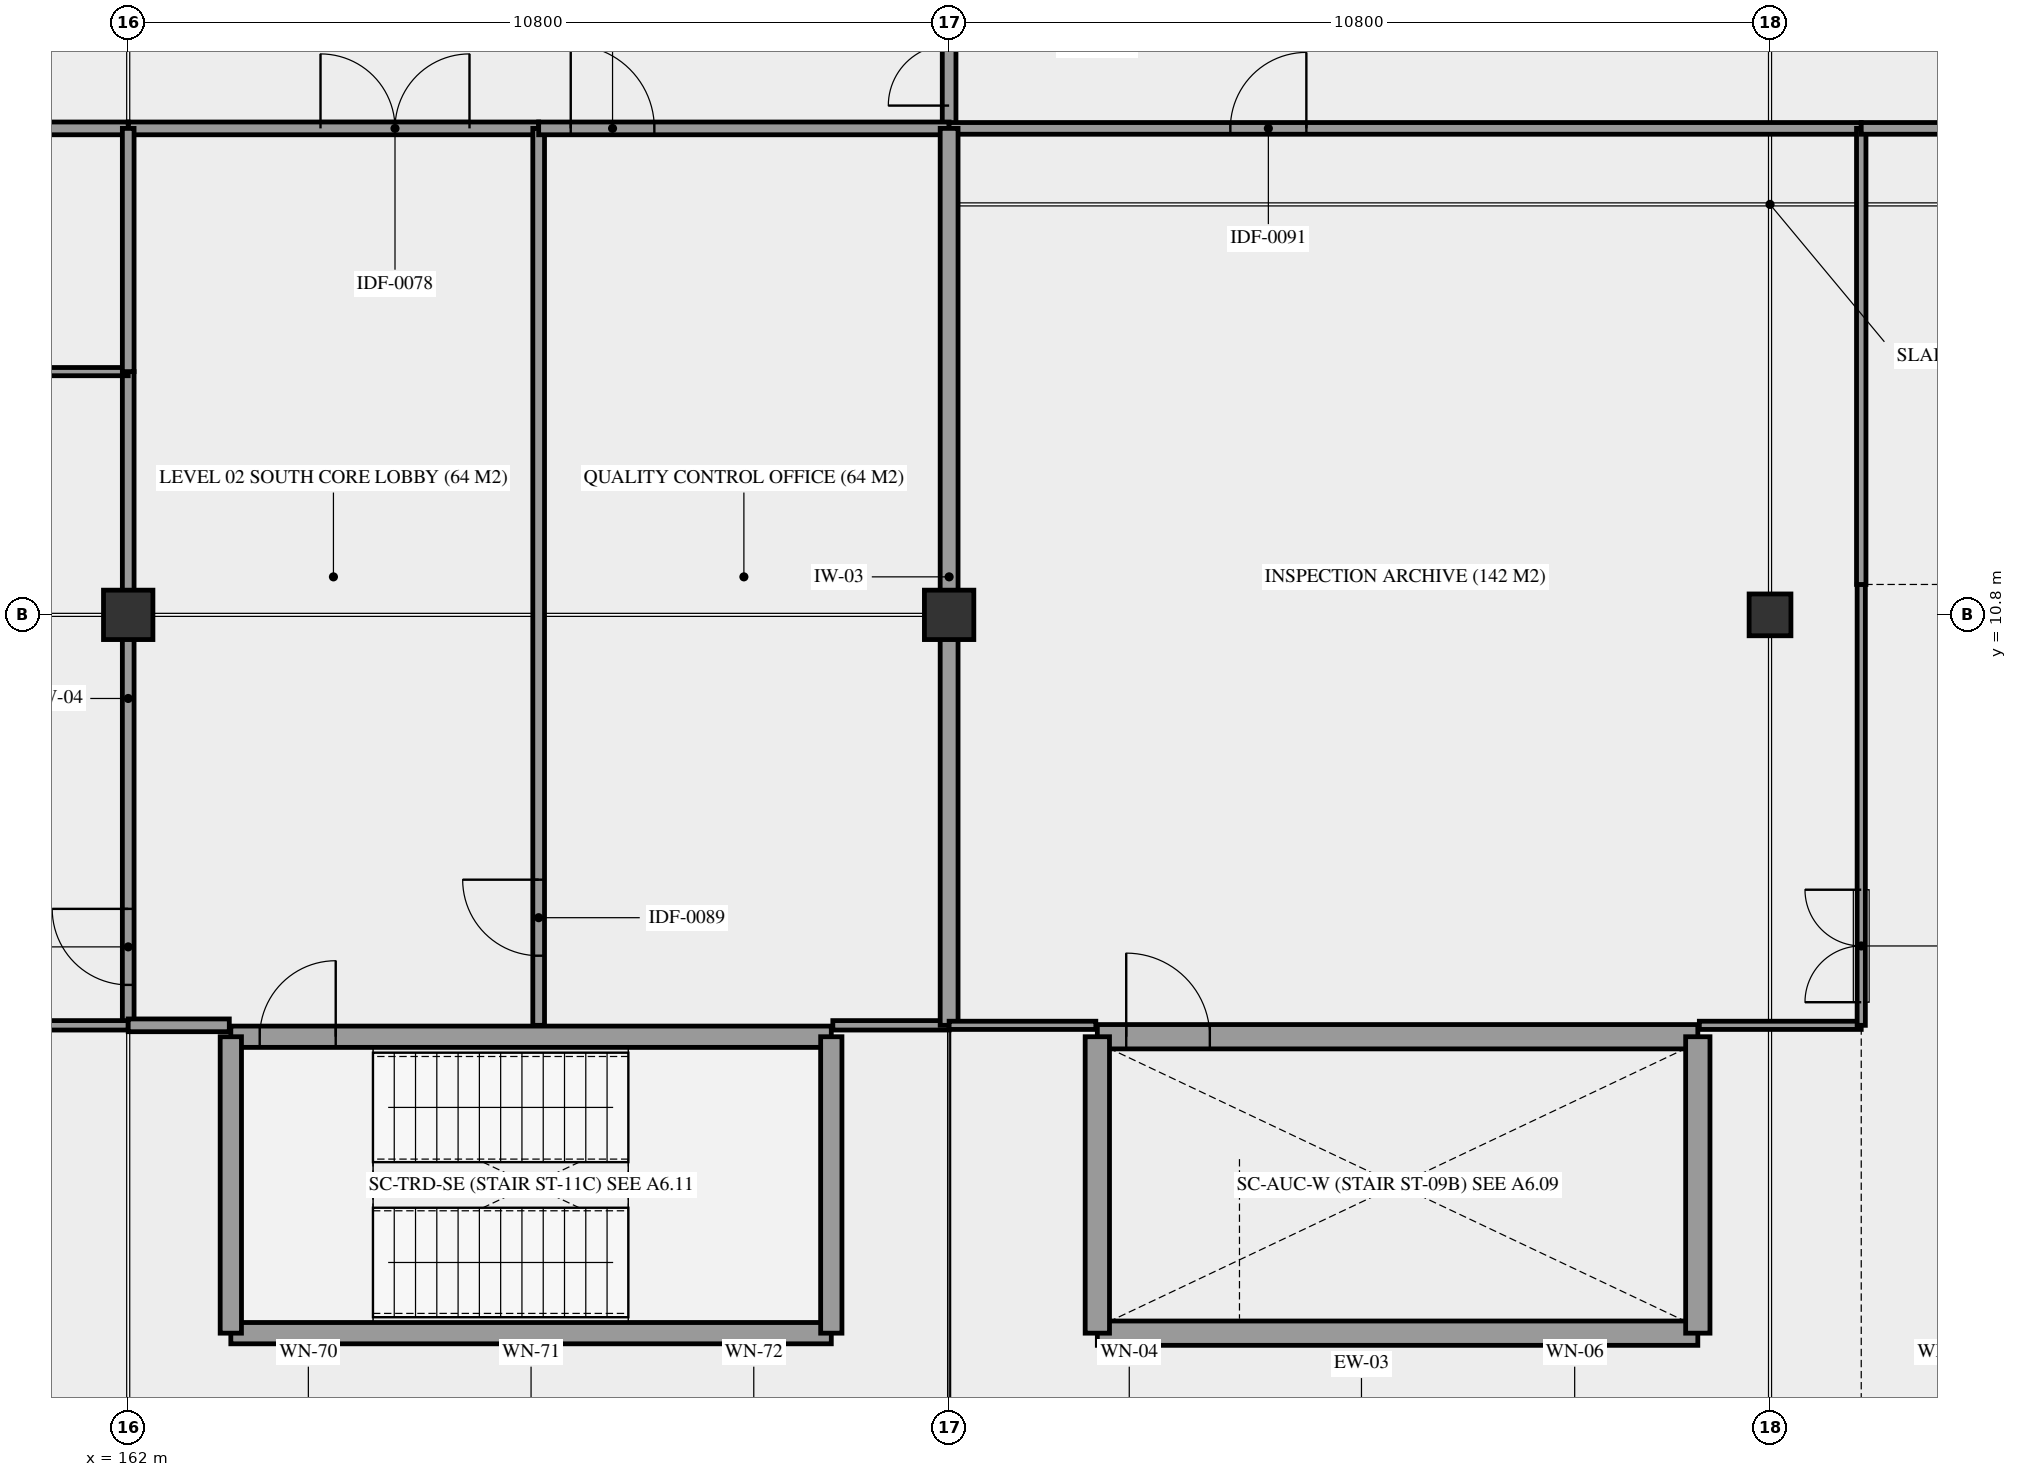
"""IFC4 building model, lengths in metres.
Left out: names, types, materials, properties, quantities, classifications, styles, units other than length and angle.
Written with IfcOpenShell. Run it as: python <this file> out.ifc"""

import sys

from ifc_helpers import new_model, si_unit, direction, frame, frame_2d, origin, origin_2d, place, context, subcontext, project, spatial, rectangle, extrude, element, fill, save


model = new_model("IFC4")
c1 = context("Model", 3, precision=1e-05, world=origin(), true_north=direction((0.0, 1.0)))
c2 = subcontext(c1, "Body", "Model", "MODEL_VIEW")
j1 = project(units=[si_unit("LENGTHUNIT", "METRE"), si_unit("PLANEANGLEUNIT", "RADIAN")], contexts=[c1])
p1 = place(None, origin())
s1 = spatial("IfcSite", under=j1, at=p1, CompositionType="ELEMENT")
p2 = place(p1, origin())
s2 = spatial("IfcBuilding", under=s1, at=p2, CompositionType="ELEMENT")
p3 = place(p2, frame((0.0, 0.0, 10.08)))
s3 = spatial("IfcBuildingStorey", under=s2, at=p3, CompositionType="ELEMENT", Elevation=10.08)
for number, where, z_axis, x_axis in (
    (1, (162.0, 10.8, 0.0), (0.0, 0.0, 1.0), (1.0, 0.0, 0.0)),
    (2, (172.8, 10.8, 0.0), (0.0, 0.0, 1.0), (1.0, 0.0, 0.0)),
):
    element("IfcColumn", number, at=place(p3, frame(where, z_axis=z_axis, x_axis=x_axis)), inside=s3, PredefinedType="COLUMN", context=c2, shape_type="SweptSolid", body=[
        extrude(rectangle(XDim=0.65, YDim=0.65, at=origin_2d()), origin(), (0.0, 0.0, 1.0), 4.68),
    ])
p4 = place(p3, frame((183.6, 10.8, 0.0), z_axis=(0.0, 0.0, 1.0), x_axis=(1.0, 0.0, 0.0)))
e3 = element("IfcColumn", 3, at=p4, inside=s3, PredefinedType="COLUMN", context=c2, shape_type="SweptSolid", body=[
    extrude(rectangle(XDim=0.55, YDim=0.55, at=origin_2d()), origin(), (0.0, 0.0, 1.0), 4.68),
])
p5 = place(p3, frame((174.75, 1.35, 0.0), z_axis=(0.0, 0.0, 1.0), x_axis=(1.0, 0.0, 0.0)))
e4 = element("IfcWall", 4, at=p5, inside=s3, PredefinedType="SHEAR", context=c2, shape_type="SweptSolid", body=[
    extrude(rectangle(XDim=7.9, YDim=0.32, at=frame_2d((3.95, 0.0))), origin(), (0.0, 0.0, 1.0), 4.68),
])
p6 = place(p3, frame((174.75, 5.25, 0.0), z_axis=(0.0, 0.0, 1.0), x_axis=(1.0, 0.0, 0.0)))
e5 = element("IfcWall", 5, at=p6, inside=s3, PredefinedType="SHEAR", context=c2, shape_type="SweptSolid", body=[
    extrude(rectangle(XDim=7.9, YDim=0.32, at=frame_2d((3.95, 0.0))), origin(), (0.0, 0.0, 1.0), 4.68),
])
p7 = place(p6, frame((0.38, 0.0, 0.0)))
e6 = element("IfcOpeningElement", 6, at=p7, cuts=e5, PredefinedType="OPENING", context=c2, shape_type="SweptSolid", body=[
    extrude(rectangle(XDim=1.1, YDim=2.2, at=frame_2d((0.55, 1.1))), frame((0.0, 0.17, 0.0), z_axis=(0.0, -1.0, 0.0), x_axis=(1.0, 0.0, 0.0)), (0.0, 0.0, 1.0), 0.34),
])
for number, where, z_axis, x_axis in (
    (7, (174.75, 1.35, 0.0), (0.0, 0.0, 1.0), (0.0, 1.0, 0.0)),
    (8, (182.65, 1.35, 0.0), (0.0, 0.0, 1.0), (0.0, 1.0, 0.0)),
):
    element("IfcWall", number, at=place(p3, frame(where, z_axis=z_axis, x_axis=x_axis)), inside=s3, PredefinedType="SHEAR", context=c2, shape_type="SweptSolid", body=[
        extrude(rectangle(XDim=3.9, YDim=0.32, at=frame_2d((1.95, 0.0))), origin(), (0.0, 0.0, 1.0), 4.68),
    ])
p8 = place(p3, frame((163.35, 1.35, 0.0), z_axis=(0.0, 0.0, 1.0), x_axis=(1.0, 0.0, 0.0)))
e9 = element("IfcWall", 9, at=p8, inside=s3, PredefinedType="SHEAR", context=c2, shape_type="SweptSolid", body=[
    extrude(rectangle(XDim=7.9, YDim=0.28, at=frame_2d((3.95, 0.0))), origin(), (0.0, 0.0, 1.0), 4.68),
])
p9 = place(p3, frame((163.35, 5.25, 0.0), z_axis=(0.0, 0.0, 1.0), x_axis=(1.0, 0.0, 0.0)))
e10 = element("IfcWall", 10, at=p9, inside=s3, PredefinedType="SHEAR", context=c2, shape_type="SweptSolid", body=[
    extrude(rectangle(XDim=7.9, YDim=0.28, at=frame_2d((3.95, 0.0))), origin(), (0.0, 0.0, 1.0), 4.68),
])
p10 = place(p9, frame((0.38, 0.0, 0.0)))
e11 = element("IfcOpeningElement", 11, at=p10, cuts=e10, PredefinedType="OPENING", context=c2, shape_type="SweptSolid", body=[
    extrude(rectangle(XDim=1.0, YDim=2.15, at=frame_2d((0.5, 1.075))), frame((0.0, 0.15, 0.0), z_axis=(0.0, -1.0, 0.0), x_axis=(1.0, 0.0, 0.0)), (0.0, 0.0, 1.0), 0.3),
])
for number, where, z_axis, x_axis in (
    (12, (163.35, 1.35, 0.0), (0.0, 0.0, 1.0), (0.0, 1.0, 0.0)),
    (13, (171.25, 1.35, 0.0), (0.0, 0.0, 1.0), (0.0, 1.0, 0.0)),
):
    element("IfcWall", number, at=place(p3, frame(where, z_axis=z_axis, x_axis=x_axis)), inside=s3, PredefinedType="SHEAR", context=c2, shape_type="SweptSolid", body=[
        extrude(rectangle(XDim=3.9, YDim=0.28, at=frame_2d((1.95, 0.0))), origin(), (0.0, 0.0, 1.0), 4.68),
    ])
p11 = place(p3, frame((162.0, 17.2, 0.0), z_axis=(0.0, 0.0, 1.0), x_axis=(1.0, 0.0, 0.0)))
e14 = element("IfcWall", 14, at=p11, inside=s3, PredefinedType="PARTITIONING", context=c2, shape_type="SweptSolid", body=[
    extrude(rectangle(XDim=5.4, YDim=0.168, at=frame_2d((2.7, 0.0))), origin(), (0.0, 0.0, 1.0), 3.23),
])
p12 = place(p11, frame((2.53, 0.0, 0.0)))
e15 = element("IfcOpeningElement", 15, at=p12, cuts=e14, PredefinedType="OPENING", context=c2, shape_type="SweptSolid", body=[
    extrude(rectangle(XDim=1.96, YDim=2.3, at=frame_2d((0.98, 1.15))), frame((0.0, 0.094, 0.0), z_axis=(0.0, -1.0, 0.0), x_axis=(1.0, 0.0, 0.0)), (0.0, 0.0, 1.0), 0.188),
])
p13 = place(p3, frame((172.8, 17.2, 0.0), z_axis=(0.0, 0.0, 1.0), x_axis=(0.0, 1.0, 0.0)))
e16 = element("IfcWall", 16, at=p13, inside=s3, PredefinedType="PARTITIONING", context=c2, shape_type="SweptSolid", body=[
    extrude(rectangle(XDim=4.4, YDim=0.18, at=frame_2d((2.2, 0.0))), origin(), (0.0, 0.0, 1.0), 3.23),
])
p14 = place(p13, frame((0.3, 0.0, 0.0)))
e17 = element("IfcOpeningElement", 17, at=p14, cuts=e16, PredefinedType="OPENING", context=c2, shape_type="SweptSolid", body=[
    extrude(rectangle(XDim=1.6, YDim=2.2, at=frame_2d((0.8, 1.1))), frame((0.0, 0.1, 0.0), z_axis=(0.0, -1.0, 0.0), x_axis=(1.0, 0.0, 0.0)), (0.0, 0.0, 1.0), 0.2),
])
p15 = place(p3, frame((162.0, 5.4, 0.0), z_axis=(0.0, 0.0, 1.0), x_axis=(0.0, 1.0, 0.0)))
e18 = element("IfcWall", 18, at=p15, inside=s3, PredefinedType="PARTITIONING", context=c2, shape_type="SweptSolid", body=[
    extrude(rectangle(XDim=8.6, YDim=0.154, at=frame_2d((4.3, 0.0))), origin(), (0.0, 0.0, 1.0), 3.23),
])
p16 = place(p15, frame((0.532, 0.0, 0.0)))
e19 = element("IfcOpeningElement", 19, at=p16, cuts=e18, PredefinedType="OPENING", context=c2, shape_type="SweptSolid", body=[
    extrude(rectangle(XDim=1.0, YDim=2.15, at=frame_2d((0.5, 1.075))), frame((0.0, 0.087, 0.0), z_axis=(0.0, -1.0, 0.0), x_axis=(1.0, 0.0, 0.0)), (0.0, 0.0, 1.0), 0.174),
])
p17 = place(p3, frame((167.4, 5.4, 0.0), z_axis=(0.0, 0.0, 1.0), x_axis=(0.0, 1.0, 0.0)))
e20 = element("IfcWall", 20, at=p17, inside=s3, PredefinedType="PARTITIONING", context=c2, shape_type="SweptSolid", body=[
    extrude(rectangle(XDim=11.8, YDim=0.154, at=frame_2d((5.9, 0.0))), origin(), (0.0, 0.0, 1.0), 3.23),
])
p18 = place(p17, frame((0.916, 0.0, 0.0)))
e21 = element("IfcOpeningElement", 21, at=p18, cuts=e20, PredefinedType="OPENING", context=c2, shape_type="SweptSolid", body=[
    extrude(rectangle(XDim=1.0, YDim=2.15, at=frame_2d((0.5, 1.075))), frame((0.0, 0.087, 0.0), z_axis=(0.0, -1.0, 0.0), x_axis=(1.0, 0.0, 0.0)), (0.0, 0.0, 1.0), 0.174),
])
p19 = place(p3, frame((167.4, 17.2, 0.0), z_axis=(0.0, 0.0, 1.0), x_axis=(1.0, 0.0, 0.0)))
e22 = element("IfcWall", 22, at=p19, inside=s3, PredefinedType="PARTITIONING", context=c2, shape_type="SweptSolid", body=[
    extrude(rectangle(XDim=5.4, YDim=0.168, at=frame_2d((2.7, 0.0))), origin(), (0.0, 0.0, 1.0), 3.23),
])
p20 = place(p19, frame((0.422, 0.0, 0.0)))
e23 = element("IfcOpeningElement", 23, at=p20, cuts=e22, PredefinedType="OPENING", context=c2, shape_type="SweptSolid", body=[
    extrude(rectangle(XDim=1.1, YDim=2.2, at=frame_2d((0.55, 1.1))), frame((0.0, 0.094, 0.0), z_axis=(0.0, -1.0, 0.0), x_axis=(1.0, 0.0, 0.0)), (0.0, 0.0, 1.0), 0.188),
])
p21 = place(p3, frame((172.8, 17.2, 0.0), z_axis=(0.0, 0.0, 1.0), x_axis=(1.0, 0.0, 0.0)))
e24 = element("IfcWall", 24, at=p21, inside=s3, PredefinedType="PARTITIONING", context=c2, shape_type="SweptSolid", body=[
    extrude(rectangle(XDim=12.0, YDim=0.154, at=frame_2d((6.0, 0.0))), origin(), (0.0, 0.0, 1.0), 3.23),
])
p22 = place(p21, frame((3.7, 0.0, 0.0)))
e25 = element("IfcOpeningElement", 25, at=p22, cuts=e24, PredefinedType="OPENING", context=c2, shape_type="SweptSolid", body=[
    extrude(rectangle(XDim=1.0, YDim=2.15, at=frame_2d((0.5, 1.075))), frame((0.0, 0.087, 0.0), z_axis=(0.0, -1.0, 0.0), x_axis=(1.0, 0.0, 0.0)), (0.0, 0.0, 1.0), 0.174),
])
p23 = place(p3, frame((151.2, 5.4, 0.0), z_axis=(0.0, 0.0, 1.0), x_axis=(1.0, 0.0, 0.0)))
e26 = element("IfcWall", 26, at=p23, inside=s3, PredefinedType="PARTITIONING", context=c2, shape_type="SweptSolid", body=[
    extrude(rectangle(XDim=10.8, YDim=0.124, at=frame_2d((5.4, 0.0))), origin(), (0.0, 0.0, 1.0), 3.23),
])
p24 = place(p3, frame((157.62, 14.0, 0.0), z_axis=(0.0, 0.0, 1.0), x_axis=(1.0, 0.0, 0.0)))
e27 = element("IfcWall", 27, at=p24, inside=s3, PredefinedType="PARTITIONING", context=c2, shape_type="SweptSolid", body=[
    extrude(rectangle(XDim=4.38, YDim=0.108, at=frame_2d((2.19, 0.0))), origin(), (0.0, 0.0, 1.0), 3.23),
])
p25 = place(p3, frame((157.62, 17.2, 0.0), z_axis=(0.0, 0.0, 1.0), x_axis=(1.0, 0.0, 0.0)))
e28 = element("IfcWall", 28, at=p25, inside=s3, PredefinedType="PARTITIONING", context=c2, shape_type="SweptSolid", body=[
    extrude(rectangle(XDim=4.38, YDim=0.168, at=frame_2d((2.19, 0.0))), origin(), (0.0, 0.0, 1.0), 3.23),
])
p26 = place(p3, frame((162.0, 5.4, 0.0), z_axis=(0.0, 0.0, 1.0), x_axis=(1.0, 0.0, 0.0)))
e29 = element("IfcWall", 29, at=p26, inside=s3, PredefinedType="PARTITIONING", context=c2, shape_type="SweptSolid", body=[
    extrude(rectangle(XDim=1.33, YDim=0.168, at=frame_2d((0.665, 0.0))), origin(), (0.0, 0.0, 1.0), 3.23),
])
p27 = place(p3, frame((162.0, 14.0, 0.0), z_axis=(0.0, 0.0, 1.0), x_axis=(0.0, 1.0, 0.0)))
e30 = element("IfcWall", 30, at=p27, inside=s3, PredefinedType="PARTITIONING", context=c2, shape_type="SweptSolid", body=[
    extrude(rectangle(XDim=3.2, YDim=0.154, at=frame_2d((1.6, 0.0))), origin(), (0.0, 0.0, 1.0), 3.23),
])
p28 = place(p3, frame((171.27, 5.4, 0.0), z_axis=(0.0, 0.0, 1.0), x_axis=(1.0, 0.0, 0.0)))
e31 = element("IfcWall", 31, at=p28, inside=s3, PredefinedType="PARTITIONING", context=c2, shape_type="SweptSolid", body=[
    extrude(rectangle(XDim=1.53, YDim=0.124, at=frame_2d((0.765, 0.0))), origin(), (0.0, 0.0, 1.0), 3.23),
])
p29 = place(p3, frame((172.8, 5.4, 0.0), z_axis=(0.0, 0.0, 1.0), x_axis=(0.0, 1.0, 0.0)))
e32 = element("IfcWall", 32, at=p29, inside=s3, PredefinedType="PARTITIONING", context=c2, shape_type="SweptSolid", body=[
    extrude(rectangle(XDim=11.8, YDim=0.235, at=frame_2d((5.9, 0.0))), origin(), (0.0, 0.0, 1.0), 3.23),
])
p30 = place(p3, frame((172.8, 5.4, 0.0), z_axis=(0.0, 0.0, 1.0), x_axis=(1.0, 0.0, 0.0)))
e33 = element("IfcWall", 33, at=p30, inside=s3, PredefinedType="PARTITIONING", context=c2, shape_type="SweptSolid", body=[
    extrude(rectangle(XDim=1.93, YDim=0.108, at=frame_2d((0.965, 0.0))), origin(), (0.0, 0.0, 1.0), 3.23),
])
p31 = place(p3, frame((182.67, 5.4, 0.0), z_axis=(0.0, 0.0, 1.0), x_axis=(1.0, 0.0, 0.0)))
e34 = element("IfcWall", 34, at=p31, inside=s3, PredefinedType="PARTITIONING", context=c2, shape_type="SweptSolid", body=[
    extrude(rectangle(XDim=2.13, YDim=0.108, at=frame_2d((1.065, 0.0))), origin(), (0.0, 0.0, 1.0), 3.23),
])
p32 = place(p3, frame((184.8, 5.4, 0.0), z_axis=(0.0, 0.0, 1.0), x_axis=(0.0, 1.0, 0.0)))
e35 = element("IfcWall", 35, at=p32, inside=s3, PredefinedType="PARTITIONING", context=c2, shape_type="SweptSolid", body=[
    extrude(rectangle(XDim=5.8, YDim=0.108, at=frame_2d((2.9, 0.0))), origin(), (0.0, 0.0, 1.0), 3.23),
])
p33 = place(p32, frame((0.304, 0.0, 0.0)))
e36 = element("IfcOpeningElement", 36, at=p33, cuts=e35, PredefinedType="OPENING", context=c2, shape_type="SweptSolid", body=[
    extrude(rectangle(XDim=1.48, YDim=2.2, at=frame_2d((0.74, 1.1))), frame((0.0, 0.064, 0.0), z_axis=(0.0, -1.0, 0.0), x_axis=(1.0, 0.0, 0.0)), (0.0, 0.0, 1.0), 0.128),
])
p34 = place(p3, frame((184.8, 11.2, 0.0), z_axis=(0.0, 0.0, 1.0), x_axis=(0.0, 1.0, 0.0)))
e37 = element("IfcWall", 37, at=p34, inside=s3, PredefinedType="PARTITIONING", context=c2, shape_type="SweptSolid", body=[
    extrude(rectangle(XDim=6.0, YDim=0.124, at=frame_2d((3.0, 0.0))), origin(), (0.0, 0.0, 1.0), 3.23),
])
p35 = place(p3, frame((184.8, 17.2, 0.0), z_axis=(0.0, 0.0, 1.0), x_axis=(1.0, 0.0, 0.0)))
e38 = element("IfcWall", 38, at=p35, inside=s3, PredefinedType="PARTITIONING", context=c2, shape_type="SweptSolid", body=[
    extrude(rectangle(XDim=10.4, YDim=0.154, at=frame_2d((5.2, 0.0))), origin(), (0.0, 0.0, 1.0), 3.23),
])
p36 = place(p7, origin())
e39 = element("IfcDoor", 39, at=p36, inside=s3, OperationType="SINGLE_SWING_LEFT", PredefinedType="DOOR", context=c2, shape_type="SweptSolid", body=[
    extrude(rectangle(XDim=1.1, YDim=2.2, at=frame_2d((0.55, 1.1))), frame((0.0, 0.025, 0.0), z_axis=(0.0, -1.0, 0.0), x_axis=(1.0, 0.0, 0.0)), (0.0, 0.0, 1.0), 0.05),
])
fill(e6, e39)
p37 = place(p10, origin())
e40 = element("IfcDoor", 40, at=p37, inside=s3, OperationType="SINGLE_SWING_RIGHT", PredefinedType="DOOR", context=c2, shape_type="SweptSolid", body=[
    extrude(rectangle(XDim=1.0, YDim=2.15, at=frame_2d((0.5, 1.075))), frame((0.0, 0.025, 0.0), z_axis=(0.0, -1.0, 0.0), x_axis=(1.0, 0.0, 0.0)), (0.0, 0.0, 1.0), 0.05),
])
fill(e11, e40)
p38 = place(p12, frame((1.96, 0.0, 0.0), z_axis=(0.0, 0.0, 1.0), x_axis=(-1.0, 0.0, 0.0)))
e41 = element("IfcDoor", 41, at=p38, inside=s3, OperationType="DOUBLE_DOOR_SINGLE_SWING", PredefinedType="DOOR", context=c2, shape_type="SweptSolid", body=[
    extrude(rectangle(XDim=1.96, YDim=2.3, at=frame_2d((0.98, 1.15))), frame((0.0, 0.025, 0.0), z_axis=(0.0, -1.0, 0.0), x_axis=(1.0, 0.0, 0.0)), (0.0, 0.0, 1.0), 0.05),
])
fill(e15, e41)
p39 = place(p14, origin())
e42 = element("IfcDoor", 42, at=p39, inside=s3, OperationType="DOUBLE_DOOR_SINGLE_SWING", PredefinedType="DOOR", context=c2, shape_type="SweptSolid", body=[
    extrude(rectangle(XDim=1.6, YDim=2.2, at=frame_2d((0.8, 1.1))), frame((0.0, 0.025, 0.0), z_axis=(0.0, -1.0, 0.0), x_axis=(1.0, 0.0, 0.0)), (0.0, 0.0, 1.0), 0.05),
])
fill(e17, e42)
p40 = place(p16, frame((1.0, 0.0, 0.0), z_axis=(0.0, 0.0, 1.0), x_axis=(-1.0, 0.0, 0.0)))
e43 = element("IfcDoor", 43, at=p40, inside=s3, OperationType="SINGLE_SWING_RIGHT", PredefinedType="DOOR", context=c2, shape_type="SweptSolid", body=[
    extrude(rectangle(XDim=1.0, YDim=2.15, at=frame_2d((0.5, 1.075))), frame((0.0, 0.025, 0.0), z_axis=(0.0, -1.0, 0.0), x_axis=(1.0, 0.0, 0.0)), (0.0, 0.0, 1.0), 0.05),
])
fill(e19, e43)
p41 = place(p18, origin())
e44 = element("IfcDoor", 44, at=p41, inside=s3, OperationType="SINGLE_SWING_RIGHT", PredefinedType="DOOR", context=c2, shape_type="SweptSolid", body=[
    extrude(rectangle(XDim=1.0, YDim=2.15, at=frame_2d((0.5, 1.075))), frame((0.0, 0.025, 0.0), z_axis=(0.0, -1.0, 0.0), x_axis=(1.0, 0.0, 0.0)), (0.0, 0.0, 1.0), 0.05),
])
fill(e21, e44)
p42 = place(p20, frame((1.1, 0.0, 0.0), z_axis=(0.0, 0.0, 1.0), x_axis=(-1.0, 0.0, 0.0)))
e45 = element("IfcDoor", 45, at=p42, inside=s3, OperationType="SINGLE_SWING_LEFT", PredefinedType="DOOR", context=c2, shape_type="SweptSolid", body=[
    extrude(rectangle(XDim=1.1, YDim=2.2, at=frame_2d((0.55, 1.1))), frame((0.0, 0.025, 0.0), z_axis=(0.0, -1.0, 0.0), x_axis=(1.0, 0.0, 0.0)), (0.0, 0.0, 1.0), 0.05),
])
fill(e23, e45)
p43 = place(p22, origin())
e46 = element("IfcDoor", 46, at=p43, inside=s3, OperationType="SINGLE_SWING_RIGHT", PredefinedType="DOOR", context=c2, shape_type="SweptSolid", body=[
    extrude(rectangle(XDim=1.0, YDim=2.15, at=frame_2d((0.5, 1.075))), frame((0.0, 0.025, 0.0), z_axis=(0.0, -1.0, 0.0), x_axis=(1.0, 0.0, 0.0)), (0.0, 0.0, 1.0), 0.05),
])
fill(e25, e46)
p44 = place(p33, origin())
e47 = element("IfcDoor", 47, at=p44, inside=s3, OperationType="DOUBLE_DOOR_SINGLE_SWING", PredefinedType="DOOR", context=c2, shape_type="SweptSolid", body=[
    extrude(rectangle(XDim=1.48, YDim=2.2, at=frame_2d((0.74, 1.1))), frame((0.0, 0.025, 0.0), z_axis=(0.0, -1.0, 0.0), x_axis=(1.0, 0.0, 0.0)), (0.0, 0.0, 1.0), 0.05),
])
fill(e36, e47)
save(model, sys.argv[1])
